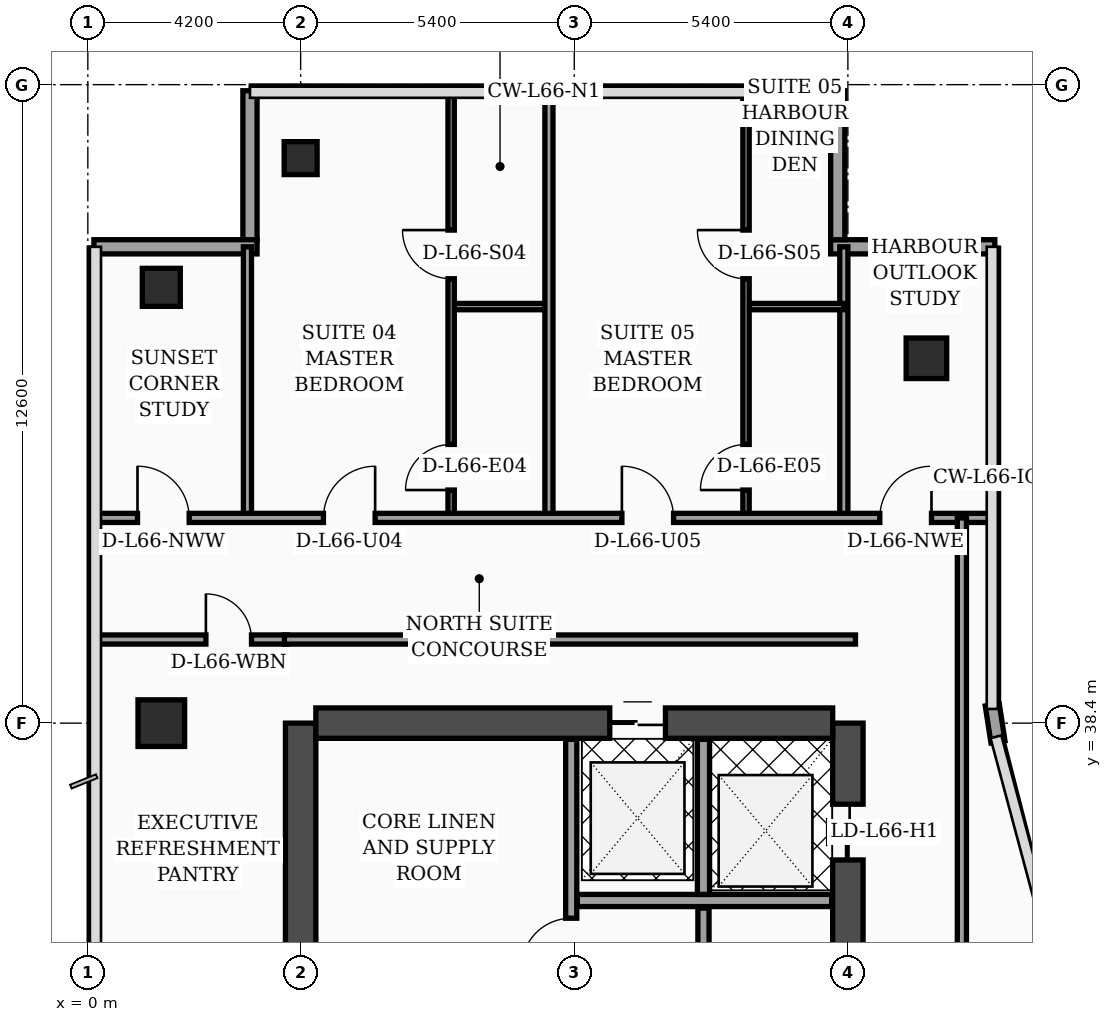
"""IFC4 building model, lengths in metres.
Left out: names, types, materials, properties, quantities, classifications, styles, units other than length and angle.
Written with IfcOpenShell. Run it as: python <this file> out.ifc"""

import sys

from ifc_helpers import new_model, si_unit, direction, frame, frame_2d, origin, origin_2d, place, context, subcontext, project, spatial, rectangle, hollow_rectangle, extrude, element, fill, save


model = new_model("IFC4")
c1 = context("Model", 3, precision=1e-05, world=origin(), true_north=direction((0.0, 1.0)))
c2 = subcontext(c1, "Body", "Model", "MODEL_VIEW")
j1 = project(units=[si_unit("LENGTHUNIT", "METRE"), si_unit("PLANEANGLEUNIT", "RADIAN")], contexts=[c1])
p1 = place(None, origin())
s1 = spatial("IfcSite", under=j1, at=p1, CompositionType="ELEMENT")
p2 = place(p1, origin())
s2 = spatial("IfcBuilding", under=s1, at=p2, CompositionType="ELEMENT")
p3 = place(p2, frame((0.0, 0.0, 267.3)))
s3 = spatial("IfcBuildingStorey", under=s2, at=p3, CompositionType="ELEMENT", Elevation=267.3)
p4 = place(p3, frame((4.2, 16.8, 0.0), z_axis=(0.0, 0.0, 1.0), x_axis=(0.0, 1.0, 0.0)))
e1 = element("IfcWall", 1, at=p4, inside=s3, PredefinedType="SHEAR", context=c2, shape_type="SweptSolid", body=[
    extrude(rectangle(XDim=21.6, YDim=0.6, at=frame_2d((10.8, 0.0))), origin(), (0.0, 0.0, 1.0), 3.56),
])
p5 = place(p3, frame((15.0, 16.8, 0.0), z_axis=(0.0, 0.0, 1.0), x_axis=(0.0, 1.0, 0.0)))
e2 = element("IfcWall", 2, at=p5, inside=s3, PredefinedType="SHEAR", context=c2, shape_type="SweptSolid", body=[
    extrude(rectangle(XDim=21.6, YDim=0.6, at=frame_2d((10.8, 0.0))), origin(), (0.0, 0.0, 1.0), 3.56),
])
p6 = place(p5, frame((8.65, 0.0, 0.0)))
e3 = element("IfcOpeningElement", 3, at=p6, cuts=e2, PredefinedType="OPENING", context=c2, shape_type="SweptSolid", body=[
    extrude(rectangle(XDim=1.1, YDim=2.2, at=frame_2d((0.55, 1.1))), frame((0.0, 0.31, 0.0), z_axis=(0.0, -1.0, 0.0), x_axis=(1.0, 0.0, 0.0)), (0.0, 0.0, 1.0), 0.62),
])
p7 = place(p5, frame((18.9, 0.0, 0.0)))
e4 = element("IfcOpeningElement", 4, at=p7, cuts=e2, PredefinedType="OPENING", context=c2, shape_type="SweptSolid", body=[
    extrude(rectangle(XDim=1.1, YDim=2.2, at=frame_2d((0.55, 1.1))), frame((0.0, 0.31, 0.0), z_axis=(0.0, -1.0, 0.0), x_axis=(1.0, 0.0, 0.0)), (0.0, 0.0, 1.0), 0.62),
])
p8 = place(p3, frame((4.5, 38.4, 0.0), z_axis=(0.0, 0.0, 1.0), x_axis=(1.0, 0.0, 0.0)))
e5 = element("IfcWall", 5, at=p8, inside=s3, PredefinedType="SHEAR", context=c2, shape_type="SweptSolid", body=[
    extrude(rectangle(XDim=10.2, YDim=0.6, at=frame_2d((5.1, 0.0))), origin(), (0.0, 0.0, 1.0), 3.56),
])
p9 = place(p8, frame((5.8, 0.0, 0.0)))
e6 = element("IfcOpeningElement", 6, at=p9, cuts=e5, PredefinedType="OPENING", context=c2, shape_type="SweptSolid", body=[
    extrude(rectangle(XDim=1.1, YDim=2.2, at=frame_2d((0.55, 1.1))), frame((0.0, 0.31, 0.0), z_axis=(0.0, -1.0, 0.0), x_axis=(1.0, 0.0, 0.0)), (0.0, 0.0, 1.0), 0.62),
])
p10 = place(p3, frame((1.45, 38.4, 0.0), z_axis=(0.0, 0.0, 1.0), x_axis=(1.0, 0.0, 0.0)))
e7 = element("IfcColumn", 7, at=p10, inside=s3, PredefinedType="COLUMN", context=c2, shape_type="SweptSolid", body=[
    extrude(rectangle(XDim=0.92, YDim=0.92, at=origin_2d()), origin(), (0.0, 0.0, 1.0), 3.56),
])
p11 = place(p3, frame((1.45, 47.0, 0.0), z_axis=(0.0, 0.0, 1.0), x_axis=(1.0, 0.0, 0.0)))
e8 = element("IfcColumn", 8, at=p11, inside=s3, PredefinedType="COLUMN", context=c2, shape_type="SweptSolid", body=[
    extrude(hollow_rectangle(XDim=0.75, YDim=0.75, WallThickness=0.032, at=origin_2d()), origin(), (0.0, 0.0, 1.0), 3.56),
])
p12 = place(p3, frame((4.2, 49.55, 0.0), z_axis=(0.0, 0.0, 1.0), x_axis=(1.0, 0.0, 0.0)))
e9 = element("IfcColumn", 9, at=p12, inside=s3, PredefinedType="COLUMN", context=c2, shape_type="SweptSolid", body=[
    extrude(hollow_rectangle(XDim=0.65, YDim=0.65, WallThickness=0.028, at=origin_2d()), origin(), (0.0, 0.0, 1.0), 3.56),
])
p13 = place(p3, frame((16.55, 45.6, 0.0), z_axis=(0.0, 0.0, 1.0), x_axis=(1.0, 0.0, 0.0)))
e10 = element("IfcColumn", 10, at=p13, inside=s3, PredefinedType="COLUMN", context=c2, shape_type="SweptSolid", body=[
    extrude(rectangle(XDim=0.8, YDim=0.8, at=origin_2d()), origin(), (0.0, 0.0, 1.0), 3.56),
])
p14 = place(p3, frame((17.962, 38.03, 0.0), z_axis=(0.0, 0.0, 1.0), x_axis=(-0.15141125477, 0.988470855377, 0.0)))
e11 = element("IfcWall", 11, at=p14, inside=s3, PredefinedType="SOLIDWALL", context=c2, shape_type="SweptSolid", body=[
    extrude(rectangle(XDim=0.739, YDim=0.28, at=frame_2d((0.369, 0.0))), origin(), (0.0, 0.0, 1.0), 3.56),
])
p15 = place(p3, frame((17.9, 47.8, 0.0), z_axis=(0.0, 0.0, 1.0), x_axis=(-1.0, 0.0, 0.0)))
e12 = element("IfcWall", 12, at=p15, inside=s3, PredefinedType="SOLIDWALL", context=c2, shape_type="SweptSolid", body=[
    extrude(rectangle(XDim=3.24, YDim=0.28, at=frame_2d((1.62, 0.0))), origin(), (0.0, 0.0, 1.0), 3.56),
])
p16 = place(p3, frame((14.8, 47.94, 0.0), z_axis=(0.0, 0.0, 1.0), x_axis=(0.0, 1.0, 0.0)))
e13 = element("IfcWall", 13, at=p16, inside=s3, PredefinedType="SOLIDWALL", context=c2, shape_type="SweptSolid", body=[
    extrude(rectangle(XDim=2.94, YDim=0.28, at=frame_2d((1.47, 0.0))), origin(), (0.0, 0.0, 1.0), 3.56),
])
p17 = place(p3, frame((3.2, 50.88, 0.0), z_axis=(0.0, 0.0, 1.0), x_axis=(0.0, -1.0, 0.0)))
e14 = element("IfcWall", 14, at=p17, inside=s3, PredefinedType="SOLIDWALL", context=c2, shape_type="SweptSolid", body=[
    extrude(rectangle(XDim=2.94, YDim=0.28, at=frame_2d((1.47, 0.0))), origin(), (0.0, 0.0, 1.0), 3.09),
])
p18 = place(p3, frame((3.34, 47.8, 0.0), z_axis=(0.0, 0.0, 1.0), x_axis=(-1.0, 0.0, 0.0)))
e15 = element("IfcWall", 15, at=p18, inside=s3, PredefinedType="SOLIDWALL", context=c2, shape_type="SweptSolid", body=[
    extrude(rectangle(XDim=3.22, YDim=0.28, at=frame_2d((1.61, 0.0))), origin(), (0.0, 0.0, 1.0), 3.09),
])
p19 = place(p3, frame((9.54, 32.92, 0.0), z_axis=(0.0, 0.0, 1.0), x_axis=(0.0, 1.0, 0.0)))
e16 = element("IfcWall", 16, at=p19, inside=s3, PredefinedType="SOLIDWALL", context=c2, shape_type="SweptSolid", body=[
    extrude(rectangle(XDim=5.16, YDim=0.22, at=frame_2d((2.58, 0.0))), origin(), (0.0, 0.0, 1.0), 3.56),
])
p20 = place(p19, frame((0.65, 0.0, 0.0)))
e17 = element("IfcOpeningElement", 17, at=p20, cuts=e16, PredefinedType="OPENING", context=c2, shape_type="SweptSolid", body=[
    extrude(rectangle(XDim=0.98, YDim=2.15, at=frame_2d((0.49, 1.075))), frame((0.0, 0.12, 0.0), z_axis=(0.0, -1.0, 0.0), x_axis=(1.0, 0.0, 0.0)), (0.0, 0.0, 1.0), 0.24),
])
p21 = place(p3, frame((12.15, 27.0, 0.0), z_axis=(0.0, 0.0, 1.0), x_axis=(0.0, 1.0, 0.0)))
e18 = element("IfcWall", 18, at=p21, inside=s3, PredefinedType="SOLIDWALL", context=c2, shape_type="SweptSolid", body=[
    extrude(rectangle(XDim=7.75, YDim=0.22, at=frame_2d((3.875, 0.0))), origin(), (0.0, 0.0, 1.0), 3.56),
])
p22 = place(p21, frame((0.8, 0.0, 0.0)))
e19 = element("IfcOpeningElement", 19, at=p22, cuts=e18, PredefinedType="OPENING", context=c2, shape_type="SweptSolid", body=[
    extrude(rectangle(XDim=0.98, YDim=2.15, at=frame_2d((0.49, 1.075))), frame((0.0, 0.12, 0.0), z_axis=(0.0, -1.0, 0.0), x_axis=(1.0, 0.0, 0.0)), (0.0, 0.0, 1.0), 0.24),
])
p23 = place(p3, frame((9.66, 34.9, 0.0), z_axis=(0.0, 0.0, 1.0), x_axis=(1.0, 0.0, 0.0)))
e20 = element("IfcWall", 20, at=p23, inside=s3, PredefinedType="SOLIDWALL", context=c2, shape_type="SweptSolid", body=[
    extrude(rectangle(XDim=5.02, YDim=0.24, at=frame_2d((2.51, 0.0))), origin(), (0.0, 0.0, 1.0), 3.56),
])
p24 = place(p3, frame((12.15, 35.02, 0.0), z_axis=(0.0, 0.0, 1.0), x_axis=(0.0, 1.0, 0.0)))
e21 = element("IfcWall", 21, at=p24, inside=s3, PredefinedType="SOLIDWALL", context=c2, shape_type="SweptSolid", body=[
    extrude(rectangle(XDim=3.06, YDim=0.24, at=frame_2d((1.53, 0.0))), origin(), (0.0, 0.0, 1.0), 3.56),
])
p25 = place(p3, frame((0.08, 40.05, 0.0), z_axis=(0.0, 0.0, 1.0), x_axis=(1.0, 0.0, 0.0)))
e22 = element("IfcWall", 22, at=p25, inside=s3, PredefinedType="PARTITIONING", context=c2, shape_type="SweptSolid", body=[
    extrude(rectangle(XDim=3.85, YDim=0.18, at=frame_2d((1.925, 0.0))), origin(), (0.0, 0.0, 1.0), 2.99),
])
p26 = place(p25, frame((2.25, 0.0, 0.0)))
e23 = element("IfcOpeningElement", 23, at=p26, cuts=e22, PredefinedType="OPENING", context=c2, shape_type="SweptSolid", body=[
    extrude(rectangle(XDim=0.9, YDim=2.15, at=frame_2d((0.45, 1.075))), frame((0.0, 0.1, 0.0), z_axis=(0.0, -1.0, 0.0), x_axis=(1.0, 0.0, 0.0)), (0.0, 0.0, 1.0), 0.2),
])
p27 = place(p3, frame((3.15, 42.45, 0.0), z_axis=(0.0, 0.0, 1.0), x_axis=(0.0, 1.0, 0.0)))
e24 = element("IfcWall", 24, at=p27, inside=s3, PredefinedType="PARTITIONING", context=c2, shape_type="SweptSolid", body=[
    extrude(rectangle(XDim=5.35, YDim=0.16, at=frame_2d((2.675, 0.0))), origin(), (0.0, 0.0, 1.0), 3.14),
])
p28 = place(p3, frame((14.92, 42.45, 0.0), z_axis=(0.0, 0.0, 1.0), x_axis=(0.0, 1.0, 0.0)))
e25 = element("IfcWall", 25, at=p28, inside=s3, PredefinedType="PARTITIONING", context=c2, shape_type="SweptSolid", body=[
    extrude(rectangle(XDim=5.35, YDim=0.16, at=frame_2d((2.675, 0.0))), origin(), (0.0, 0.0, 1.0), 3.09),
])
p29 = place(p3, frame((7.17, 46.62, 0.0), z_axis=(0.0, 0.0, 1.0), x_axis=(1.0, 0.0, 0.0)))
e26 = element("IfcWall", 26, at=p29, inside=s3, PredefinedType="PARTITIONING", context=c2, shape_type="SweptSolid", body=[
    extrude(rectangle(XDim=1.93, YDim=0.125, at=frame_2d((0.965, 0.0))), origin(), (0.0, 0.0, 1.0), 3.56),
])
p30 = place(p3, frame((7.17, 42.45, 0.0), z_axis=(0.0, 0.0, 1.0), x_axis=(0.0, 1.0, 0.0)))
e27 = element("IfcWall", 27, at=p30, inside=s3, PredefinedType="PARTITIONING", context=c2, shape_type="SweptSolid", body=[
    extrude(rectangle(XDim=8.49, YDim=0.125, at=frame_2d((4.245, 0.0))), origin(), (0.0, 0.0, 1.0), 3.09),
])
p31 = place(p30, frame((0.55, 0.0, 0.0)))
e28 = element("IfcOpeningElement", 28, at=p31, cuts=e27, PredefinedType="OPENING", context=c2, shape_type="SweptSolid", body=[
    extrude(rectangle(XDim=0.9, YDim=2.15, at=frame_2d((0.45, 1.075))), frame((0.0, 0.073, 0.0), z_axis=(0.0, -1.0, 0.0), x_axis=(1.0, 0.0, 0.0)), (0.0, 0.0, 1.0), 0.145),
])
p32 = place(p30, frame((4.72, 0.0, 0.0)))
e29 = element("IfcOpeningElement", 29, at=p32, cuts=e27, PredefinedType="OPENING", context=c2, shape_type="SweptSolid", body=[
    extrude(rectangle(XDim=0.96, YDim=2.2, at=frame_2d((0.48, 1.1))), frame((0.0, 0.073, 0.0), z_axis=(0.0, -1.0, 0.0), x_axis=(1.0, 0.0, 0.0)), (0.0, 0.0, 1.0), 0.145),
])
p33 = place(p3, frame((12.99, 46.62, 0.0), z_axis=(0.0, 0.0, 1.0), x_axis=(1.0, 0.0, 0.0)))
e30 = element("IfcWall", 30, at=p33, inside=s3, PredefinedType="PARTITIONING", context=c2, shape_type="SweptSolid", body=[
    extrude(rectangle(XDim=1.93, YDim=0.125, at=frame_2d((0.965, 0.0))), origin(), (0.0, 0.0, 1.0), 3.09),
])
p34 = place(p3, frame((12.99, 42.45, 0.0), z_axis=(0.0, 0.0, 1.0), x_axis=(0.0, 1.0, 0.0)))
e31 = element("IfcWall", 31, at=p34, inside=s3, PredefinedType="PARTITIONING", context=c2, shape_type="SweptSolid", body=[
    extrude(rectangle(XDim=8.49, YDim=0.125, at=frame_2d((4.245, 0.0))), origin(), (0.0, 0.0, 1.0), 3.09),
])
p35 = place(p34, frame((0.55, 0.0, 0.0)))
e32 = element("IfcOpeningElement", 32, at=p35, cuts=e31, PredefinedType="OPENING", context=c2, shape_type="SweptSolid", body=[
    extrude(rectangle(XDim=0.9, YDim=2.15, at=frame_2d((0.45, 1.075))), frame((0.0, 0.073, 0.0), z_axis=(0.0, -1.0, 0.0), x_axis=(1.0, 0.0, 0.0)), (0.0, 0.0, 1.0), 0.145),
])
p36 = place(p34, frame((4.72, 0.0, 0.0)))
e33 = element("IfcOpeningElement", 33, at=p36, cuts=e31, PredefinedType="OPENING", context=c2, shape_type="SweptSolid", body=[
    extrude(rectangle(XDim=0.96, YDim=2.2, at=frame_2d((0.48, 1.1))), frame((0.0, 0.073, 0.0), z_axis=(0.0, -1.0, 0.0), x_axis=(1.0, 0.0, 0.0)), (0.0, 0.0, 1.0), 0.145),
])
p37 = place(p3, frame((9.1, 42.45, 0.0), z_axis=(0.0, 0.0, 1.0), x_axis=(0.0, 1.0, 0.0)))
e34 = element("IfcWall", 34, at=p37, inside=s3, PredefinedType="PARTITIONING", context=c2, shape_type="SweptSolid", body=[
    extrude(rectangle(XDim=8.49, YDim=0.16, at=frame_2d((4.245, 0.0))), origin(), (0.0, 0.0, 1.0), 3.09),
])
p38 = place(p3, frame((0.08, 42.45, 0.0), z_axis=(0.0, 0.0, 1.0), x_axis=(1.0, 0.0, 0.0)))
e35 = element("IfcWall", 35, at=p38, inside=s3, PredefinedType="PARTITIONING", context=c2, shape_type="SweptSolid", body=[
    extrude(rectangle(XDim=17.77, YDim=0.18, at=frame_2d((8.885, 0.0))), origin(), (0.0, 0.0, 1.0), 2.99),
])
p39 = place(p38, frame((0.9, 0.0, 0.0)))
e36 = element("IfcOpeningElement", 36, at=p39, cuts=e35, PredefinedType="OPENING", context=c2, shape_type="SweptSolid", body=[
    extrude(rectangle(XDim=1.02, YDim=2.2, at=frame_2d((0.51, 1.1))), frame((0.0, 0.1, 0.0), z_axis=(0.0, -1.0, 0.0), x_axis=(1.0, 0.0, 0.0)), (0.0, 0.0, 1.0), 0.2),
])
p40 = place(p38, frame((4.57, 0.0, 0.0)))
e37 = element("IfcOpeningElement", 37, at=p40, cuts=e35, PredefinedType="OPENING", context=c2, shape_type="SweptSolid", body=[
    extrude(rectangle(XDim=1.02, YDim=2.2, at=frame_2d((0.51, 1.1))), frame((0.0, 0.1, 0.0), z_axis=(0.0, -1.0, 0.0), x_axis=(1.0, 0.0, 0.0)), (0.0, 0.0, 1.0), 0.2),
])
p41 = place(p38, frame((10.46, 0.0, 0.0)))
e38 = element("IfcOpeningElement", 38, at=p41, cuts=e35, PredefinedType="OPENING", context=c2, shape_type="SweptSolid", body=[
    extrude(rectangle(XDim=1.02, YDim=2.2, at=frame_2d((0.51, 1.1))), frame((0.0, 0.1, 0.0), z_axis=(0.0, -1.0, 0.0), x_axis=(1.0, 0.0, 0.0)), (0.0, 0.0, 1.0), 0.2),
])
p42 = place(p38, frame((15.55, 0.0, 0.0)))
e39 = element("IfcOpeningElement", 39, at=p42, cuts=e35, PredefinedType="OPENING", context=c2, shape_type="SweptSolid", body=[
    extrude(rectangle(XDim=1.02, YDim=2.2, at=frame_2d((0.51, 1.1))), frame((0.0, 0.1, 0.0), z_axis=(0.0, -1.0, 0.0), x_axis=(1.0, 0.0, 0.0)), (0.0, 0.0, 1.0), 0.2),
])
p43 = place(p3, frame((17.25, 24.3, 0.0), z_axis=(0.0, 0.0, 1.0), x_axis=(0.0, 1.0, 0.0)))
e40 = element("IfcWall", 40, at=p43, inside=s3, PredefinedType="PARTITIONING", context=c2, shape_type="SweptSolid", body=[
    extrude(rectangle(XDim=18.15, YDim=0.18, at=frame_2d((9.075, 0.0))), origin(), (0.0, 0.0, 1.0), 2.99),
])
p44 = place(p43, frame((3.2, 0.0, 0.0)))
e41 = element("IfcOpeningElement", 41, at=p44, cuts=e40, PredefinedType="OPENING", context=c2, shape_type="SweptSolid", body=[
    extrude(rectangle(XDim=1.02, YDim=2.2, at=frame_2d((0.51, 1.1))), frame((0.0, 0.1, 0.0), z_axis=(0.0, -1.0, 0.0), x_axis=(1.0, 0.0, 0.0)), (0.0, 0.0, 1.0), 0.2),
])
p45 = place(p3, frame((3.88, 40.05, 0.0), z_axis=(0.0, 0.0, 1.0), x_axis=(1.0, 0.0, 0.0)))
e42 = element("IfcWall", 42, at=p45, inside=s3, PredefinedType="PARTITIONING", context=c2, shape_type="SweptSolid", body=[
    extrude(rectangle(XDim=11.27, YDim=0.18, at=frame_2d((5.635, 0.0))), origin(), (0.0, 0.0, 1.0), 2.99),
])
p46 = place(p20, origin())
e43 = element("IfcDoor", 43, at=p46, inside=s3, OperationType="SINGLE_SWING_LEFT", PredefinedType="DOOR", context=c2, shape_type="SweptSolid", body=[
    extrude(rectangle(XDim=0.98, YDim=2.15, at=frame_2d((0.49, 1.075))), frame((0.0, 0.025, 0.0), z_axis=(0.0, -1.0, 0.0), x_axis=(1.0, 0.0, 0.0)), (0.0, 0.0, 1.0), 0.05),
])
fill(e17, e43)
p47 = place(p26, origin())
e44 = element("IfcDoor", 44, at=p47, inside=s3, OperationType="SINGLE_SWING_LEFT", PredefinedType="DOOR", context=c2, shape_type="SweptSolid", body=[
    extrude(rectangle(XDim=0.9, YDim=2.15, at=frame_2d((0.45, 1.075))), frame((0.0, 0.025, 0.0), z_axis=(0.0, -1.0, 0.0), x_axis=(1.0, 0.0, 0.0)), (0.0, 0.0, 1.0), 0.05),
])
fill(e23, e44)
p48 = place(p31, origin())
e45 = element("IfcDoor", 45, at=p48, inside=s3, OperationType="SINGLE_SWING_LEFT", PredefinedType="DOOR", context=c2, shape_type="SweptSolid", body=[
    extrude(rectangle(XDim=0.9, YDim=2.15, at=frame_2d((0.45, 1.075))), frame((0.0, 0.025, 0.0), z_axis=(0.0, -1.0, 0.0), x_axis=(1.0, 0.0, 0.0)), (0.0, 0.0, 1.0), 0.05),
])
fill(e28, e45)
p49 = place(p32, origin())
e46 = element("IfcDoor", 46, at=p49, inside=s3, OperationType="SINGLE_SWING_RIGHT", PredefinedType="DOOR", context=c2, shape_type="SweptSolid", body=[
    extrude(rectangle(XDim=0.96, YDim=2.2, at=frame_2d((0.48, 1.1))), frame((0.0, 0.025, 0.0), z_axis=(0.0, -1.0, 0.0), x_axis=(1.0, 0.0, 0.0)), (0.0, 0.0, 1.0), 0.05),
])
fill(e29, e46)
p50 = place(p35, origin())
e47 = element("IfcDoor", 47, at=p50, inside=s3, OperationType="SINGLE_SWING_LEFT", PredefinedType="DOOR", context=c2, shape_type="SweptSolid", body=[
    extrude(rectangle(XDim=0.9, YDim=2.15, at=frame_2d((0.45, 1.075))), frame((0.0, 0.025, 0.0), z_axis=(0.0, -1.0, 0.0), x_axis=(1.0, 0.0, 0.0)), (0.0, 0.0, 1.0), 0.05),
])
fill(e32, e47)
p51 = place(p36, origin())
e48 = element("IfcDoor", 48, at=p51, inside=s3, OperationType="SINGLE_SWING_RIGHT", PredefinedType="DOOR", context=c2, shape_type="SweptSolid", body=[
    extrude(rectangle(XDim=0.96, YDim=2.2, at=frame_2d((0.48, 1.1))), frame((0.0, 0.025, 0.0), z_axis=(0.0, -1.0, 0.0), x_axis=(1.0, 0.0, 0.0)), (0.0, 0.0, 1.0), 0.05),
])
fill(e33, e48)
p52 = place(p39, origin())
e49 = element("IfcDoor", 49, at=p52, inside=s3, OperationType="SINGLE_SWING_LEFT", PredefinedType="DOOR", context=c2, shape_type="SweptSolid", body=[
    extrude(rectangle(XDim=1.02, YDim=2.2, at=frame_2d((0.51, 1.1))), frame((0.0, 0.025, 0.0), z_axis=(0.0, -1.0, 0.0), x_axis=(1.0, 0.0, 0.0)), (0.0, 0.0, 1.0), 0.05),
])
fill(e36, e49)
p53 = place(p40, origin())
e50 = element("IfcDoor", 50, at=p53, inside=s3, OperationType="SINGLE_SWING_RIGHT", PredefinedType="DOOR", context=c2, shape_type="SweptSolid", body=[
    extrude(rectangle(XDim=1.02, YDim=2.2, at=frame_2d((0.51, 1.1))), frame((0.0, 0.025, 0.0), z_axis=(0.0, -1.0, 0.0), x_axis=(1.0, 0.0, 0.0)), (0.0, 0.0, 1.0), 0.05),
])
fill(e37, e50)
p54 = place(p41, origin())
e51 = element("IfcDoor", 51, at=p54, inside=s3, OperationType="SINGLE_SWING_LEFT", PredefinedType="DOOR", context=c2, shape_type="SweptSolid", body=[
    extrude(rectangle(XDim=1.02, YDim=2.2, at=frame_2d((0.51, 1.1))), frame((0.0, 0.025, 0.0), z_axis=(0.0, -1.0, 0.0), x_axis=(1.0, 0.0, 0.0)), (0.0, 0.0, 1.0), 0.05),
])
fill(e38, e51)
p55 = place(p42, origin())
e52 = element("IfcDoor", 52, at=p55, inside=s3, OperationType="SINGLE_SWING_RIGHT", PredefinedType="DOOR", context=c2, shape_type="SweptSolid", body=[
    extrude(rectangle(XDim=1.02, YDim=2.2, at=frame_2d((0.51, 1.1))), frame((0.0, 0.025, 0.0), z_axis=(0.0, -1.0, 0.0), x_axis=(1.0, 0.0, 0.0)), (0.0, 0.0, 1.0), 0.05),
])
fill(e39, e52)
p56 = place(p7, origin())
e53 = element("IfcDoor", 53, at=p56, inside=s3, OperationType="DOUBLE_DOOR_SLIDING", PredefinedType="DOOR", context=c2, shape_type="SweptSolid", body=[
    extrude(rectangle(XDim=1.1, YDim=2.2, at=frame_2d((0.55, 1.1))), frame((0.0, 0.025, 0.0), z_axis=(0.0, -1.0, 0.0), x_axis=(1.0, 0.0, 0.0)), (0.0, 0.0, 1.0), 0.05),
])
fill(e4, e53)
p57 = place(p9, origin())
e54 = element("IfcDoor", 54, at=p57, inside=s3, OperationType="DOUBLE_DOOR_SLIDING", PredefinedType="DOOR", context=c2, shape_type="SweptSolid", body=[
    extrude(rectangle(XDim=1.1, YDim=2.2, at=frame_2d((0.55, 1.1))), frame((0.0, 0.025, 0.0), z_axis=(0.0, -1.0, 0.0), x_axis=(1.0, 0.0, 0.0)), (0.0, 0.0, 1.0), 0.05),
])
fill(e6, e54)
save(model, sys.argv[1])
